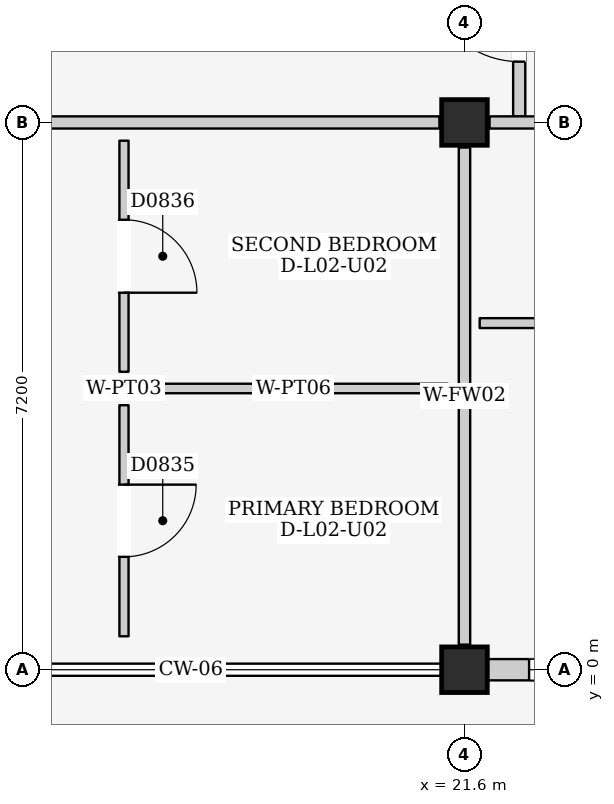
"""IFC4 building model, lengths in metres.
Left out: names, types, materials, properties, quantities, classifications, styles, units other than length and angle.
Written with IfcOpenShell. Run it as: python <this file> out.ifc"""

import sys

from ifc_helpers import new_model, si_unit, direction, frame, frame_2d, origin, origin_2d, place, context, subcontext, project, spatial, rectangle, extrude, element, fill, save


model = new_model("IFC4")
c1 = context("Model", 3, precision=1e-05, world=origin(), true_north=direction((0.0, 1.0)))
c2 = subcontext(c1, "Body", "Model", "MODEL_VIEW")
j1 = project(units=[si_unit("LENGTHUNIT", "METRE"), si_unit("PLANEANGLEUNIT", "RADIAN")], contexts=[c1])
p1 = place(None, origin())
s1 = spatial("IfcSite", under=j1, at=p1, CompositionType="ELEMENT")
p2 = place(p1, origin())
s2 = spatial("IfcBuilding", under=s1, at=p2, CompositionType="ELEMENT")
p3 = place(p2, frame((0.0, 0.0, 9.0)))
s3 = spatial("IfcBuildingStorey", under=s2, at=p3, CompositionType="ELEMENT", Elevation=9.0)
for number, where, z_axis, x_axis in (
    (1, (21.6, 0.0, 0.0), (0.0, 0.0, 1.0), (1.0, 0.0, 0.0)),
    (2, (21.6, 7.2, 0.0), (0.0, 0.0, 1.0), (1.0, 0.0, 0.0)),
):
    element("IfcColumn", number, at=place(p3, frame(where, z_axis=z_axis, x_axis=x_axis)), inside=s3, PredefinedType="COLUMN", context=c2, shape_type="SweptSolid", body=[
        extrude(rectangle(XDim=0.6, YDim=0.6, at=origin_2d()), origin(), (0.0, 0.0, 1.0), 3.2),
    ])
p4 = place(p3, frame((21.9, 0.0, 0.0), z_axis=(0.0, 0.0, 1.0), x_axis=(1.0, 0.0, 0.0)))
e3 = element("IfcWall", 3, at=p4, inside=s3, PredefinedType="ELEMENTEDWALL", context=c2, shape_type="SweptSolid", body=[
    extrude(rectangle(XDim=6.6, YDim=0.28, at=frame_2d((3.3, 0.0))), origin(), (0.0, 0.0, 1.0), 2.425),
])
p5 = place(p4, frame((3.85, 0.0, 0.0)))
e4 = element("IfcOpeningElement", 4, at=p5, cuts=e3, PredefinedType="OPENING", context=c2, shape_type="SweptSolid", body=[
    extrude(rectangle(XDim=1.8, YDim=2.12, at=frame_2d((0.9, 1.06))), frame((0.0, 0.155, 0.0), z_axis=(0.0, -1.0, 0.0), x_axis=(1.0, 0.0, 0.0)), (0.0, 0.0, 1.0), 0.31),
])
p6 = place(p4, frame((0.55, 0.0, 0.815)))
e5 = element("IfcOpeningElement", 5, at=p6, cuts=e3, PredefinedType="OPENING", context=c2, shape_type="SweptSolid", body=[
    extrude(rectangle(XDim=1.35, YDim=1.5, at=frame_2d((0.675, 0.75))), frame((0.0, 0.155, 0.0), z_axis=(0.0, -1.0, 0.0), x_axis=(1.0, 0.0, 0.0)), (0.0, 0.0, 1.0), 0.31),
])
p7 = place(p3, frame((22.32, 7.28, 0.0), z_axis=(0.0, 0.0, 1.0), x_axis=(0.0, 1.0, 0.0)))
e6 = element("IfcWall", 6, at=p7, inside=s3, PredefinedType="PARTITIONING", context=c2, shape_type="SweptSolid", body=[
    extrude(rectangle(XDim=4.32, YDim=0.16, at=frame_2d((2.16, 0.0))), origin(), (0.0, 0.0, 1.0), 2.96),
])
p8 = place(p7, frame((0.72, 0.0, 0.0)))
e7 = element("IfcOpeningElement", 7, at=p8, cuts=e6, PredefinedType="OPENING", context=c2, shape_type="SweptSolid", body=[
    extrude(rectangle(XDim=1.2, YDim=2.2, at=frame_2d((0.6, 1.1))), frame((0.0, 0.095, 0.0), z_axis=(0.0, -1.0, 0.0), x_axis=(1.0, 0.0, 0.0)), (0.0, 0.0, 1.0), 0.19),
])
p9 = place(p3, frame((14.73, 7.2, 0.0), z_axis=(0.0, 0.0, 1.0), x_axis=(1.0, 0.0, 0.0)))
e8 = element("IfcWall", 8, at=p9, inside=s3, PredefinedType="PARTITIONING", context=c2, shape_type="SweptSolid", body=[
    extrude(rectangle(XDim=6.54, YDim=0.16, at=frame_2d((3.27, 0.0))), origin(), (0.0, 0.0, 1.0), 2.345),
])
p10 = place(p3, frame((21.6, 0.33, 0.0), z_axis=(0.0, 0.0, 1.0), x_axis=(0.0, 1.0, 0.0)))
e9 = element("IfcWall", 9, at=p10, inside=s3, PredefinedType="PARTITIONING", context=c2, shape_type="SweptSolid", body=[
    extrude(rectangle(XDim=6.54, YDim=0.15, at=frame_2d((3.27, 0.0))), origin(), (0.0, 0.0, 1.0), 2.395),
])
p11 = place(p3, frame((17.12, 0.44, 0.0), z_axis=(0.0, 0.0, 1.0), x_axis=(0.0, 1.0, 0.0)))
e10 = element("IfcWall", 10, at=p11, inside=s3, PredefinedType="PARTITIONING", context=c2, shape_type="SweptSolid", body=[
    extrude(rectangle(XDim=3.04, YDim=0.12, at=frame_2d((1.52, 0.0))), origin(), (0.0, 0.0, 1.0), 2.96),
])
p12 = place(p11, frame((1.045, 0.0, 0.0)))
e11 = element("IfcOpeningElement", 11, at=p12, cuts=e10, PredefinedType="OPENING", context=c2, shape_type="SweptSolid", body=[
    extrude(rectangle(XDim=0.95, YDim=2.15, at=frame_2d((0.475, 1.075))), frame((0.0, 0.075, 0.0), z_axis=(0.0, -1.0, 0.0), x_axis=(1.0, 0.0, 0.0)), (0.0, 0.0, 1.0), 0.15),
])
p13 = place(p3, frame((17.32, 3.7, 0.0), z_axis=(0.0, 0.0, 1.0), x_axis=(1.0, 0.0, 0.0)))
e12 = element("IfcWall", 12, at=p13, inside=s3, PredefinedType="PARTITIONING", context=c2, shape_type="SweptSolid", body=[
    extrude(rectangle(XDim=4.06, YDim=0.125, at=frame_2d((2.03, 0.0))), origin(), (0.0, 0.0, 1.0), 2.96),
])
p14 = place(p3, frame((17.12, 3.92, 0.0), z_axis=(0.0, 0.0, 1.0), x_axis=(0.0, 1.0, 0.0)))
e13 = element("IfcWall", 13, at=p14, inside=s3, PredefinedType="PARTITIONING", context=c2, shape_type="SweptSolid", body=[
    extrude(rectangle(XDim=3.04, YDim=0.12, at=frame_2d((1.52, 0.0))), origin(), (0.0, 0.0, 1.0), 2.96),
])
p15 = place(p14, frame((1.04, 0.0, 0.0)))
e14 = element("IfcOpeningElement", 14, at=p15, cuts=e13, PredefinedType="OPENING", context=c2, shape_type="SweptSolid", body=[
    extrude(rectangle(XDim=0.96, YDim=2.15, at=frame_2d((0.48, 1.075))), frame((0.0, 0.075, 0.0), z_axis=(0.0, -1.0, 0.0), x_axis=(1.0, 0.0, 0.0)), (0.0, 0.0, 1.0), 0.15),
])
p16 = place(p3, frame((21.93, 7.2, 0.0), z_axis=(0.0, 0.0, 1.0), x_axis=(1.0, 0.0, 0.0)))
e15 = element("IfcWall", 15, at=p16, inside=s3, PredefinedType="PARTITIONING", context=c2, shape_type="SweptSolid", body=[
    extrude(rectangle(XDim=6.54, YDim=0.16, at=frame_2d((3.27, 0.0))), origin(), (0.0, 0.0, 1.0), 2.345),
])
p17 = place(p16, frame((4.095, 0.0, 0.0)))
e16 = element("IfcOpeningElement", 16, at=p17, cuts=e15, PredefinedType="OPENING", context=c2, shape_type="SweptSolid", body=[
    extrude(rectangle(XDim=1.05, YDim=2.15, at=frame_2d((0.525, 1.075))), frame((0.0, 0.095, 0.0), z_axis=(0.0, -1.0, 0.0), x_axis=(1.0, 0.0, 0.0)), (0.0, 0.0, 1.0), 0.19),
])
p18 = place(p3, frame((21.8, 4.56, 0.0), z_axis=(0.0, 0.0, 1.0), x_axis=(1.0, 0.0, 0.0)))
e17 = element("IfcWall", 17, at=p18, inside=s3, PredefinedType="PARTITIONING", context=c2, shape_type="SweptSolid", body=[
    extrude(rectangle(XDim=2.05, YDim=0.13, at=frame_2d((1.025, 0.0))), origin(), (0.0, 0.0, 1.0), 2.96),
])
p19 = place(p6, origin())
e18 = element("IfcWindow", 18, at=p19, inside=s3, PartitioningType="SINGLE_PANEL", PredefinedType="WINDOW", context=c2, shape_type="SweptSolid", body=[
    extrude(rectangle(XDim=1.35, YDim=1.5, at=frame_2d((0.675, 0.75))), frame((0.0, 0.03, 0.0), z_axis=(0.0, -1.0, 0.0), x_axis=(1.0, 0.0, 0.0)), (0.0, 0.0, 1.0), 0.06),
])
fill(e5, e18)
p20 = place(p8, origin())
e19 = element("IfcDoor", 19, at=p20, inside=s3, OperationType="SINGLE_SWING_RIGHT", PredefinedType="DOOR", context=c2, shape_type="SweptSolid", body=[
    extrude(rectangle(XDim=1.2, YDim=2.2, at=frame_2d((0.6, 1.1))), frame((0.0, 0.025, 0.0), z_axis=(0.0, -1.0, 0.0), x_axis=(1.0, 0.0, 0.0)), (0.0, 0.0, 1.0), 0.05),
])
fill(e7, e19)
p21 = place(p12, frame((0.95, 0.0, 0.0), z_axis=(0.0, 0.0, 1.0), x_axis=(-1.0, 0.0, 0.0)))
e20 = element("IfcDoor", 20, at=p21, inside=s3, OperationType="SINGLE_SWING_LEFT", PredefinedType="DOOR", context=c2, shape_type="SweptSolid", body=[
    extrude(rectangle(XDim=0.95, YDim=2.15, at=frame_2d((0.475, 1.075))), frame((0.0, 0.025, 0.0), z_axis=(0.0, -1.0, 0.0), x_axis=(1.0, 0.0, 0.0)), (0.0, 0.0, 1.0), 0.05),
])
fill(e11, e20)
p22 = place(p15, frame((0.96, 0.0, 0.0), z_axis=(0.0, 0.0, 1.0), x_axis=(-1.0, 0.0, 0.0)))
e21 = element("IfcDoor", 21, at=p22, inside=s3, OperationType="SINGLE_SWING_RIGHT", PredefinedType="DOOR", context=c2, shape_type="SweptSolid", body=[
    extrude(rectangle(XDim=0.96, YDim=2.15, at=frame_2d((0.48, 1.075))), frame((0.0, 0.025, 0.0), z_axis=(0.0, -1.0, 0.0), x_axis=(1.0, 0.0, 0.0)), (0.0, 0.0, 1.0), 0.05),
])
fill(e14, e21)
save(model, sys.argv[1])
